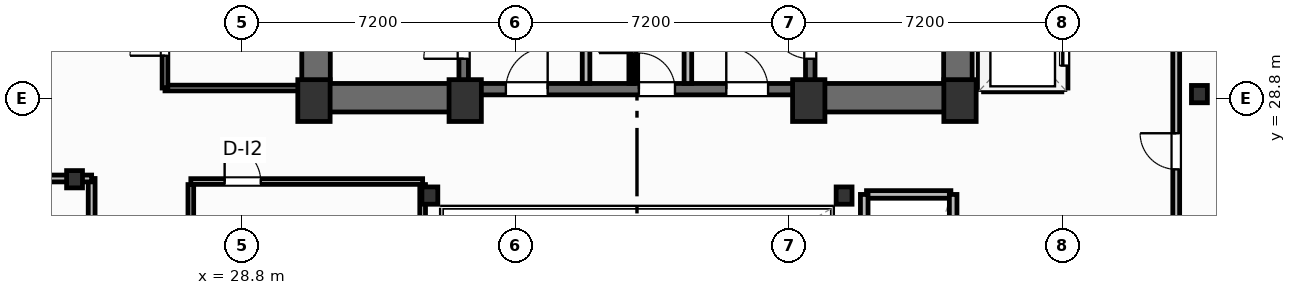
"""IFC4 building model, lengths in metres.
Left out: names, types, materials, properties, quantities, classifications, styles, units other than length and angle.
Written with IfcOpenShell. Run it as: python <this file> out.ifc"""

import sys

from ifc_helpers import new_model, si_unit, direction, frame, frame_2d, origin, origin_2d, place, context, subcontext, project, spatial, rectangle, i_section, extrude, element, fill, save


model = new_model("IFC4")
c1 = context("Model", 3, precision=1e-05, world=origin(), true_north=direction((0.0, 1.0)))
c2 = subcontext(c1, "Body", "Model", "MODEL_VIEW")
j1 = project(units=[si_unit("LENGTHUNIT", "METRE"), si_unit("PLANEANGLEUNIT", "RADIAN")], contexts=[c1])
p1 = place(None, origin())
s1 = spatial("IfcSite", under=j1, at=p1, CompositionType="ELEMENT")
p2 = place(p1, origin())
s2 = spatial("IfcBuilding", under=s1, at=p2, CompositionType="ELEMENT")
p3 = place(p2, frame((0.0, 0.0, 155.0)))
s3 = spatial("IfcBuildingStorey", under=s2, at=p3, CompositionType="ELEMENT", Elevation=155.0)
for number, where, z_axis, x_axis in (
    (1, (30.7, 28.75, 0.0), (0.0, 0.0, 1.0), (1.0, 0.0, 0.0)),
    (2, (34.68, 28.75, 0.0), (0.0, 0.0, 1.0), (1.0, 0.0, 0.0)),
    (3, (43.72, 28.75, 0.0), (0.0, 0.0, 1.0), (1.0, 0.0, 0.0)),
    (4, (47.7, 28.75, 0.0), (0.0, 0.0, 1.0), (1.0, 0.0, 0.0)),
):
    element("IfcColumn", number, at=place(p3, frame(where, z_axis=z_axis, x_axis=x_axis)), inside=s3, PredefinedType="COLUMN", context=c2, shape_type="SweptSolid", body=[
        extrude(rectangle(XDim=0.85, YDim=1.1, at=origin_2d()), origin(), (0.0, 0.0, 1.0), 3.7),
    ])
for number, where, z_axis, x_axis in (
    (5, (33.75, 26.25, 0.0), (0.0, 0.0, 1.0), (1.0, 0.0, 0.0)),
    (6, (44.65, 26.25, 0.0), (0.0, 0.0, 1.0), (1.0, 0.0, 0.0)),
    (7, (24.4, 26.68, 0.0), (0.0, 0.0, 1.0), (1.0, 0.0, 0.0)),
    (8, (54.0, 28.92, 0.0), (0.0, 0.0, 1.0), (1.0, 0.0, 0.0)),
):
    element("IfcColumn", number, at=place(p3, frame(where, z_axis=z_axis, x_axis=x_axis)), inside=s3, PredefinedType="COLUMN", context=c2, shape_type="SweptSolid", body=[
        extrude(i_section(OverallWidth=0.418, OverallDepth=0.455, WebThickness=0.042, FlangeThickness=0.068, FilletRadius=0.025, at=origin_2d()), origin(), (0.0, 0.0, 1.0), 3.7),
    ])
for number, where, z_axis, x_axis in (
    (9, (30.755, 29.2, 0.0), (0.0, 0.0, 1.0), (0.0, 1.0, 0.0)),
    (10, (47.645, 29.2, 0.0), (0.0, 0.0, 1.0), (0.0, 1.0, 0.0)),
):
    element("IfcWall", number, at=place(p3, frame(where, z_axis=z_axis, x_axis=x_axis)), inside=s3, PredefinedType="SHEAR", context=c2, shape_type="SweptSolid", body=[
        extrude(rectangle(XDim=9.22, YDim=0.75, at=frame_2d((4.61, 0.0))), origin(), (0.0, 0.0, 1.0), 3.45),
    ])
p4 = place(p3, frame((30.38, 28.825, 0.0), z_axis=(0.0, 0.0, 1.0), x_axis=(1.0, 0.0, 0.0)))
e11 = element("IfcWall", 11, at=p4, inside=s3, PredefinedType="SHEAR", context=c2, shape_type="SweptSolid", body=[
    extrude(rectangle(XDim=4.42, YDim=0.75, at=frame_2d((2.21, 0.0))), origin(), (0.0, 0.0, 1.0), 3.45),
])
p5 = place(p3, frame((43.6, 28.825, 0.0), z_axis=(0.0, 0.0, 1.0), x_axis=(1.0, 0.0, 0.0)))
e12 = element("IfcWall", 12, at=p5, inside=s3, PredefinedType="SHEAR", context=c2, shape_type="SweptSolid", body=[
    extrude(rectangle(XDim=4.42, YDim=0.75, at=frame_2d((2.21, 0.0))), origin(), (0.0, 0.0, 1.0), 3.45),
])
p6 = place(p3, frame((34.8, 29.05, 0.0), z_axis=(0.0, 0.0, 1.0), x_axis=(1.0, 0.0, 0.0)))
e13 = element("IfcWall", 13, at=p6, inside=s3, PredefinedType="SHEAR", context=c2, shape_type="SweptSolid", body=[
    extrude(rectangle(XDim=8.8, YDim=0.3, at=frame_2d((4.4, 0.0))), origin(), (0.0, 0.0, 1.0), 3.45),
])
p7 = place(p6, frame((0.95, 0.0, 0.0)))
e14 = element("IfcOpeningElement", 14, at=p7, cuts=e13, PredefinedType="OPENING", context=c2, shape_type="SweptSolid", body=[
    extrude(rectangle(XDim=1.1, YDim=2.15, at=frame_2d((0.55, 1.075))), frame((0.0, 0.16, 0.0), z_axis=(0.0, -1.0, 0.0), x_axis=(1.0, 0.0, 0.0)), (0.0, 0.0, 1.0), 0.32),
])
p8 = place(p6, frame((6.75, 0.0, 0.0)))
e15 = element("IfcOpeningElement", 15, at=p8, cuts=e13, PredefinedType="OPENING", context=c2, shape_type="SweptSolid", body=[
    extrude(rectangle(XDim=1.1, YDim=2.15, at=frame_2d((0.55, 1.075))), frame((0.0, 0.16, 0.0), z_axis=(0.0, -1.0, 0.0), x_axis=(1.0, 0.0, 0.0)), (0.0, 0.0, 1.0), 0.32),
])
p9 = place(p6, frame((4.45, 0.0, 0.0)))
e16 = element("IfcOpeningElement", 16, at=p9, cuts=e13, PredefinedType="OPENING", context=c2, shape_type="SweptSolid", body=[
    extrude(rectangle(XDim=0.95, YDim=2.15, at=frame_2d((0.475, 1.075))), frame((0.0, 0.16, 0.0), z_axis=(0.0, -1.0, 0.0), x_axis=(1.0, 0.0, 0.0)), (0.0, 0.0, 1.0), 0.32),
])
p10 = place(p3, frame((34.64, 29.2, 0.0), z_axis=(0.0, 0.0, 1.0), x_axis=(0.0, 1.0, 0.0)))
e17 = element("IfcWall", 17, at=p10, inside=s3, PredefinedType="SHEAR", context=c2, shape_type="SweptSolid", body=[
    extrude(rectangle(XDim=9.22, YDim=0.25, at=frame_2d((4.61, 0.0))), origin(), (0.0, 0.0, 1.0), 3.45),
])
p11 = place(p10, frame((0.65, 0.0, 0.0)))
e18 = element("IfcOpeningElement", 18, at=p11, cuts=e17, PredefinedType="OPENING", context=c2, shape_type="SweptSolid", body=[
    extrude(rectangle(XDim=1.05, YDim=2.15, at=frame_2d((0.525, 1.075))), frame((0.0, 0.135, 0.0), z_axis=(0.0, -1.0, 0.0), x_axis=(1.0, 0.0, 0.0)), (0.0, 0.0, 1.0), 0.27),
])
p12 = place(p3, frame((43.76, 29.2, 0.0), z_axis=(0.0, 0.0, 1.0), x_axis=(0.0, 1.0, 0.0)))
e19 = element("IfcWall", 19, at=p12, inside=s3, PredefinedType="SHEAR", context=c2, shape_type="SweptSolid", body=[
    extrude(rectangle(XDim=9.22, YDim=0.25, at=frame_2d((4.61, 0.0))), origin(), (0.0, 0.0, 1.0), 3.45),
])
p13 = place(p12, frame((0.65, 0.0, 0.0)))
e20 = element("IfcOpeningElement", 20, at=p13, cuts=e19, PredefinedType="OPENING", context=c2, shape_type="SweptSolid", body=[
    extrude(rectangle(XDim=1.05, YDim=2.15, at=frame_2d((0.525, 1.075))), frame((0.0, 0.135, 0.0), z_axis=(0.0, -1.0, 0.0), x_axis=(1.0, 0.0, 0.0)), (0.0, 0.0, 1.0), 0.27),
])
p14 = place(p3, frame((24.85, 19.24, 0.0), z_axis=(0.0, 0.0, 1.0), x_axis=(0.0, 1.0, 0.0)))
e21 = element("IfcWall", 21, at=p14, inside=s3, PredefinedType="PARTITIONING", context=c2, shape_type="SweptSolid", body=[
    extrude(rectangle(XDim=7.46, YDim=0.18, at=frame_2d((3.73, 0.0))), origin(), (0.0, 0.0, 1.0), 3.45),
])
p15 = place(p14, frame((3.235, 0.0, 0.0)))
e22 = element("IfcOpeningElement", 22, at=p15, cuts=e21, PredefinedType="OPENING", context=c2, shape_type="SweptSolid", body=[
    extrude(rectangle(XDim=0.95, YDim=2.05, at=frame_2d((0.475, 1.025))), frame((0.0, 0.1, 0.0), z_axis=(0.0, -1.0, 0.0), x_axis=(1.0, 0.0, 0.0)), (0.0, 0.0, 1.0), 0.2),
])
p16 = place(p3, frame((2.078, 26.7, 0.0), z_axis=(0.0, 0.0, 1.0), x_axis=(1.0, 0.0, 0.0)))
e23 = element("IfcWall", 23, at=p16, inside=s3, PredefinedType="PARTITIONING", context=c2, shape_type="SweptSolid", body=[
    extrude(rectangle(XDim=22.772, YDim=0.18, at=frame_2d((11.386, 0.0))), origin(), (0.0, 0.0, 1.0), 2.662),
])
p17 = place(p3, frame((53.39, 19.24, 0.0), z_axis=(0.0, 0.0, 1.0), x_axis=(0.0, 1.0, 0.0)))
e24 = element("IfcWall", 24, at=p17, inside=s3, PredefinedType="PARTITIONING", context=c2, shape_type="SweptSolid", body=[
    extrude(rectangle(XDim=20.06, YDim=0.18, at=frame_2d((10.03, 0.0))), origin(), (0.0, 0.0, 1.0), 3.45),
])
p18 = place(p17, frame((7.7, 0.0, 0.0)))
e25 = element("IfcOpeningElement", 25, at=p18, cuts=e24, PredefinedType="OPENING", context=c2, shape_type="SweptSolid", body=[
    extrude(rectangle(XDim=0.95, YDim=2.05, at=frame_2d((0.475, 1.025))), frame((0.0, 0.1, 0.0), z_axis=(0.0, -1.0, 0.0), x_axis=(1.0, 0.0, 0.0)), (0.0, 0.0, 1.0), 0.2),
])
for number, where, z_axis, x_axis in (
    (26, (37.86, 29.2, 0.0), (0.0, 0.0, 1.0), (0.0, 1.0, 0.0)),
    (27, (40.54, 29.2, 0.0), (0.0, 0.0, 1.0), (0.0, 1.0, 0.0)),
):
    element("IfcWall", number, at=place(p3, frame(where, z_axis=z_axis, x_axis=x_axis)), inside=s3, PredefinedType="PARTITIONING", context=c2, shape_type="SweptSolid", body=[
        extrude(rectangle(XDim=5.18, YDim=0.2, at=frame_2d((2.59, 0.0))), origin(), (0.0, 0.0, 1.0), 3.45),
    ])
p19 = place(p3, frame((39.05, 29.2, 0.0), z_axis=(0.0, 0.0, 1.0), x_axis=(0.0, 1.0, 0.0)))
e28 = element("IfcWall", 28, at=p19, inside=s3, PredefinedType="PARTITIONING", context=c2, shape_type="SweptSolid", body=[
    extrude(rectangle(XDim=5.22, YDim=0.125, at=frame_2d((2.61, 0.0))), origin(), (0.0, 0.0, 1.0), 3.45),
])
p20 = place(p19, frame((0.8, 0.0, 0.0)))
e29 = element("IfcOpeningElement", 29, at=p20, cuts=e28, PredefinedType="OPENING", context=c2, shape_type="SweptSolid", body=[
    extrude(rectangle(XDim=0.85, YDim=2.05, at=frame_2d((0.425, 1.025))), frame((0.0, 0.073, 0.0), z_axis=(0.0, -1.0, 0.0), x_axis=(1.0, 0.0, 0.0)), (0.0, 0.0, 1.0), 0.145),
])
p21 = place(p19, frame((3.4, 0.0, 0.0)))
e30 = element("IfcOpeningElement", 30, at=p21, cuts=e28, PredefinedType="OPENING", context=c2, shape_type="SweptSolid", body=[
    extrude(rectangle(XDim=0.85, YDim=2.05, at=frame_2d((0.425, 1.025))), frame((0.0, 0.073, 0.0), z_axis=(0.0, -1.0, 0.0), x_axis=(1.0, 0.0, 0.0)), (0.0, 0.0, 1.0), 0.145),
])
p22 = place(p3, frame((27.46, 26.62, 0.0), z_axis=(0.0, 0.0, 1.0), x_axis=(1.0, 0.0, 0.0)))
e31 = element("IfcWall", 31, at=p22, inside=s3, PredefinedType="PARTITIONING", context=c2, shape_type="SweptSolid", body=[
    extrude(rectangle(XDim=6.1, YDim=0.15, at=frame_2d((3.05, 0.0))), origin(), (0.0, 0.0, 1.0), 2.662),
])
p23 = place(p22, frame((0.89, 0.0, 0.0)))
e32 = element("IfcOpeningElement", 32, at=p23, cuts=e31, PredefinedType="OPENING", context=c2, shape_type="SweptSolid", body=[
    extrude(rectangle(XDim=0.95, YDim=2.05, at=frame_2d((0.475, 1.025))), frame((0.0, 0.085, 0.0), z_axis=(0.0, -1.0, 0.0), x_axis=(1.0, 0.0, 0.0)), (0.0, 0.0, 1.0), 0.17),
])
p24 = place(p3, frame((27.46, 19.38, 0.0), z_axis=(0.0, 0.0, 1.0), x_axis=(0.0, 1.0, 0.0)))
e33 = element("IfcWall", 33, at=p24, inside=s3, PredefinedType="PARTITIONING", context=c2, shape_type="SweptSolid", body=[
    extrude(rectangle(XDim=7.16, YDim=0.15, at=frame_2d((3.58, 0.0))), origin(), (0.0, 0.0, 1.0), 3.45),
])
p25 = place(p24, frame((1.1, 0.0, 0.0)))
e34 = element("IfcOpeningElement", 34, at=p25, cuts=e33, PredefinedType="OPENING", context=c2, shape_type="SweptSolid", body=[
    extrude(rectangle(XDim=0.9, YDim=2.05, at=frame_2d((0.45, 1.025))), frame((0.0, 0.085, 0.0), z_axis=(0.0, -1.0, 0.0), x_axis=(1.0, 0.0, 0.0)), (0.0, 0.0, 1.0), 0.17),
])
p26 = place(p3, frame((33.56, 19.38, 0.0), z_axis=(0.0, 0.0, 1.0), x_axis=(0.0, 1.0, 0.0)))
e35 = element("IfcWall", 35, at=p26, inside=s3, PredefinedType="PARTITIONING", context=c2, shape_type="SweptSolid", body=[
    extrude(rectangle(XDim=7.16, YDim=0.15, at=frame_2d((3.58, 0.0))), origin(), (0.0, 0.0, 1.0), 2.824),
])
p27 = place(p3, frame((26.78, 29.08, 0.0), z_axis=(0.0, 0.0, 1.0), x_axis=(1.0, 0.0, 0.0)))
e36 = element("IfcWall", 36, at=p27, inside=s3, PredefinedType="PARTITIONING", context=c2, shape_type="SweptSolid", body=[
    extrude(rectangle(XDim=3.6, YDim=0.15, at=frame_2d((1.8, 0.0))), origin(), (0.0, 0.0, 1.0), 3.45),
])
p28 = place(p3, frame((26.78, 29.08, 0.0), z_axis=(0.0, 0.0, 1.0), x_axis=(0.0, 1.0, 0.0)))
e37 = element("IfcWall", 37, at=p28, inside=s3, PredefinedType="PARTITIONING", context=c2, shape_type="SweptSolid", body=[
    extrude(rectangle(XDim=5.87, YDim=0.15, at=frame_2d((2.935, 0.0))), origin(), (0.0, 0.0, 1.0), 3.45),
])
p29 = place(p28, frame((0.85, 0.0, 0.0)))
e38 = element("IfcOpeningElement", 38, at=p29, cuts=e37, PredefinedType="OPENING", context=c2, shape_type="SweptSolid", body=[
    extrude(rectangle(XDim=0.92, YDim=2.05, at=frame_2d((0.46, 1.025))), frame((0.0, 0.085, 0.0), z_axis=(0.0, -1.0, 0.0), x_axis=(1.0, 0.0, 0.0)), (0.0, 0.0, 1.0), 0.17),
])
p30 = place(p28, frame((3.45, 0.0, 0.0)))
e39 = element("IfcOpeningElement", 39, at=p30, cuts=e37, PredefinedType="OPENING", context=c2, shape_type="SweptSolid", body=[
    extrude(rectangle(XDim=0.85, YDim=2.05, at=frame_2d((0.425, 1.025))), frame((0.0, 0.085, 0.0), z_axis=(0.0, -1.0, 0.0), x_axis=(1.0, 0.0, 0.0)), (0.0, 0.0, 1.0), 0.17),
])
p31 = place(p3, frame((48.32, 29.08, 0.0), z_axis=(0.0, 0.0, 1.0), x_axis=(1.0, 0.0, 0.0)))
e40 = element("IfcWall", 40, at=p31, inside=s3, PredefinedType="PARTITIONING", context=c2, shape_type="SweptSolid", body=[
    extrude(rectangle(XDim=2.06, YDim=0.2, at=frame_2d((1.03, 0.0))), origin(), (0.0, 0.0, 1.0), 2.662),
])
p32 = place(p3, frame((48.28, 29.08, 0.0), z_axis=(0.0, 0.0, 1.0), x_axis=(0.0, 1.0, 0.0)))
e41 = element("IfcWall", 41, at=p32, inside=s3, PredefinedType="PARTITIONING", context=c2, shape_type="SweptSolid", body=[
    extrude(rectangle(XDim=6.89, YDim=0.2, at=frame_2d((3.445, 0.0))), origin(), (0.0, 0.0, 1.0), 3.45),
])
p33 = place(p3, frame((50.44, 29.08, 0.0), z_axis=(0.0, 0.0, 1.0), x_axis=(0.0, 1.0, 0.0)))
e42 = element("IfcWall", 42, at=p33, inside=s3, PredefinedType="PARTITIONING", context=c2, shape_type="SweptSolid", body=[
    extrude(rectangle(XDim=6.89, YDim=0.2, at=frame_2d((3.445, 0.0))), origin(), (0.0, 0.0, 1.0), 3.45),
])
p34 = place(p33, frame((0.59, 0.0, 0.0)))
e43 = element("IfcOpeningElement", 43, at=p34, cuts=e42, PredefinedType="OPENING", context=c2, shape_type="SweptSolid", body=[
    extrude(rectangle(XDim=1.1, YDim=2.15, at=frame_2d((0.55, 1.075))), frame((0.0, 0.11, 0.0), z_axis=(0.0, -1.0, 0.0), x_axis=(1.0, 0.0, 0.0)), (0.0, 0.0, 1.0), 0.22),
])
p35 = place(p33, frame((2.89, 0.0, 0.0)))
e44 = element("IfcOpeningElement", 44, at=p35, cuts=e42, PredefinedType="OPENING", context=c2, shape_type="SweptSolid", body=[
    extrude(rectangle(XDim=1.1, YDim=2.15, at=frame_2d((0.55, 1.075))), frame((0.0, 0.11, 0.0), z_axis=(0.0, -1.0, 0.0), x_axis=(1.0, 0.0, 0.0)), (0.0, 0.0, 1.0), 0.22),
])
p36 = place(p33, frame((5.19, 0.0, 0.0)))
e45 = element("IfcOpeningElement", 45, at=p36, cuts=e42, PredefinedType="OPENING", context=c2, shape_type="SweptSolid", body=[
    extrude(rectangle(XDim=1.1, YDim=2.15, at=frame_2d((0.55, 1.075))), frame((0.0, 0.11, 0.0), z_axis=(0.0, -1.0, 0.0), x_axis=(1.0, 0.0, 0.0)), (0.0, 0.0, 1.0), 0.22),
])
p37 = place(p3, frame((45.24, 26.28, 0.0), z_axis=(0.0, 0.0, 1.0), x_axis=(1.0, 0.0, 0.0)))
e46 = element("IfcWall", 46, at=p37, inside=s3, PredefinedType="PARTITIONING", context=c2, shape_type="SweptSolid", body=[
    extrude(rectangle(XDim=2.22, YDim=0.2, at=frame_2d((1.11, 0.0))), origin(), (0.0, 0.0, 1.0), 3.45),
])
for number, where, z_axis, x_axis in (
    (47, (45.18, 19.38, 0.0), (0.0, 0.0, 1.0), (0.0, 1.0, 0.0)),
    (48, (47.52, 19.38, 0.0), (0.0, 0.0, 1.0), (0.0, 1.0, 0.0)),
):
    element("IfcWall", number, at=place(p3, frame(where, z_axis=z_axis, x_axis=x_axis)), inside=s3, PredefinedType="PARTITIONING", context=c2, shape_type="SweptSolid", body=[
        extrude(rectangle(XDim=6.9, YDim=0.2, at=frame_2d((3.45, 0.0))), origin(), (0.0, 0.0, 1.0), 3.45),
    ])
p38 = place(p18, origin())
e49 = element("IfcDoor", 49, at=p38, inside=s3, OperationType="SINGLE_SWING_RIGHT", PredefinedType="DOOR", context=c2, shape_type="SweptSolid", body=[
    extrude(rectangle(XDim=0.95, YDim=2.05, at=frame_2d((0.475, 1.025))), frame((0.0, 0.025, 0.0), z_axis=(0.0, -1.0, 0.0), x_axis=(1.0, 0.0, 0.0)), (0.0, 0.0, 1.0), 0.05),
])
fill(e25, e49)
p39 = place(p11, origin())
e50 = element("IfcDoor", 50, at=p39, inside=s3, OperationType="SINGLE_SWING_LEFT", PredefinedType="DOOR", context=c2, shape_type="SweptSolid", body=[
    extrude(rectangle(XDim=1.05, YDim=2.15, at=frame_2d((0.525, 1.075))), frame((0.0, 0.025, 0.0), z_axis=(0.0, -1.0, 0.0), x_axis=(1.0, 0.0, 0.0)), (0.0, 0.0, 1.0), 0.05),
])
fill(e18, e50)
p40 = place(p13, origin())
e51 = element("IfcDoor", 51, at=p40, inside=s3, OperationType="SINGLE_SWING_RIGHT", PredefinedType="DOOR", context=c2, shape_type="SweptSolid", body=[
    extrude(rectangle(XDim=1.05, YDim=2.15, at=frame_2d((0.525, 1.075))), frame((0.0, 0.025, 0.0), z_axis=(0.0, -1.0, 0.0), x_axis=(1.0, 0.0, 0.0)), (0.0, 0.0, 1.0), 0.05),
])
fill(e20, e51)
p41 = place(p7, origin())
e52 = element("IfcDoor", 52, at=p41, inside=s3, OperationType="SINGLE_SWING_RIGHT", PredefinedType="DOOR", context=c2, shape_type="SweptSolid", body=[
    extrude(rectangle(XDim=1.1, YDim=2.15, at=frame_2d((0.55, 1.075))), frame((0.0, 0.025, 0.0), z_axis=(0.0, -1.0, 0.0), x_axis=(1.0, 0.0, 0.0)), (0.0, 0.0, 1.0), 0.05),
])
fill(e14, e52)
p42 = place(p8, origin())
e53 = element("IfcDoor", 53, at=p42, inside=s3, OperationType="SINGLE_SWING_LEFT", PredefinedType="DOOR", context=c2, shape_type="SweptSolid", body=[
    extrude(rectangle(XDim=1.1, YDim=2.15, at=frame_2d((0.55, 1.075))), frame((0.0, 0.025, 0.0), z_axis=(0.0, -1.0, 0.0), x_axis=(1.0, 0.0, 0.0)), (0.0, 0.0, 1.0), 0.05),
])
fill(e15, e53)
p43 = place(p20, origin())
e54 = element("IfcDoor", 54, at=p43, inside=s3, OperationType="SINGLE_SWING_LEFT", PredefinedType="DOOR", context=c2, shape_type="SweptSolid", body=[
    extrude(rectangle(XDim=0.85, YDim=2.05, at=frame_2d((0.425, 1.025))), frame((0.0, 0.025, 0.0), z_axis=(0.0, -1.0, 0.0), x_axis=(1.0, 0.0, 0.0)), (0.0, 0.0, 1.0), 0.05),
])
fill(e29, e54)
p44 = place(p9, origin())
e55 = element("IfcDoor", 55, at=p44, inside=s3, OperationType="SINGLE_SWING_LEFT", PredefinedType="DOOR", context=c2, shape_type="SweptSolid", body=[
    extrude(rectangle(XDim=0.95, YDim=2.15, at=frame_2d((0.475, 1.075))), frame((0.0, 0.025, 0.0), z_axis=(0.0, -1.0, 0.0), x_axis=(1.0, 0.0, 0.0)), (0.0, 0.0, 1.0), 0.05),
])
fill(e16, e55)
p45 = place(p23, origin())
e56 = element("IfcDoor", 56, at=p45, inside=s3, OperationType="SINGLE_SWING_LEFT", PredefinedType="DOOR", context=c2, shape_type="SweptSolid", body=[
    extrude(rectangle(XDim=0.95, YDim=2.05, at=frame_2d((0.475, 1.025))), frame((0.0, 0.025, 0.0), z_axis=(0.0, -1.0, 0.0), x_axis=(1.0, 0.0, 0.0)), (0.0, 0.0, 1.0), 0.05),
])
fill(e32, e56)
p46 = place(p29, origin())
e57 = element("IfcDoor", 57, at=p46, inside=s3, OperationType="SINGLE_SWING_LEFT", PredefinedType="DOOR", context=c2, shape_type="SweptSolid", body=[
    extrude(rectangle(XDim=0.92, YDim=2.05, at=frame_2d((0.46, 1.025))), frame((0.0, 0.025, 0.0), z_axis=(0.0, -1.0, 0.0), x_axis=(1.0, 0.0, 0.0)), (0.0, 0.0, 1.0), 0.05),
])
fill(e38, e57)
p47 = place(p34, origin())
e58 = element("IfcDoor", 58, at=p47, inside=s3, OperationType="SLIDING_TO_LEFT", PredefinedType="DOOR", context=c2, shape_type="SweptSolid", body=[
    extrude(rectangle(XDim=1.1, YDim=2.15, at=frame_2d((0.55, 1.075))), frame((0.0, 0.025, 0.0), z_axis=(0.0, -1.0, 0.0), x_axis=(1.0, 0.0, 0.0)), (0.0, 0.0, 1.0), 0.05),
])
fill(e43, e58)
save(model, sys.argv[1])
